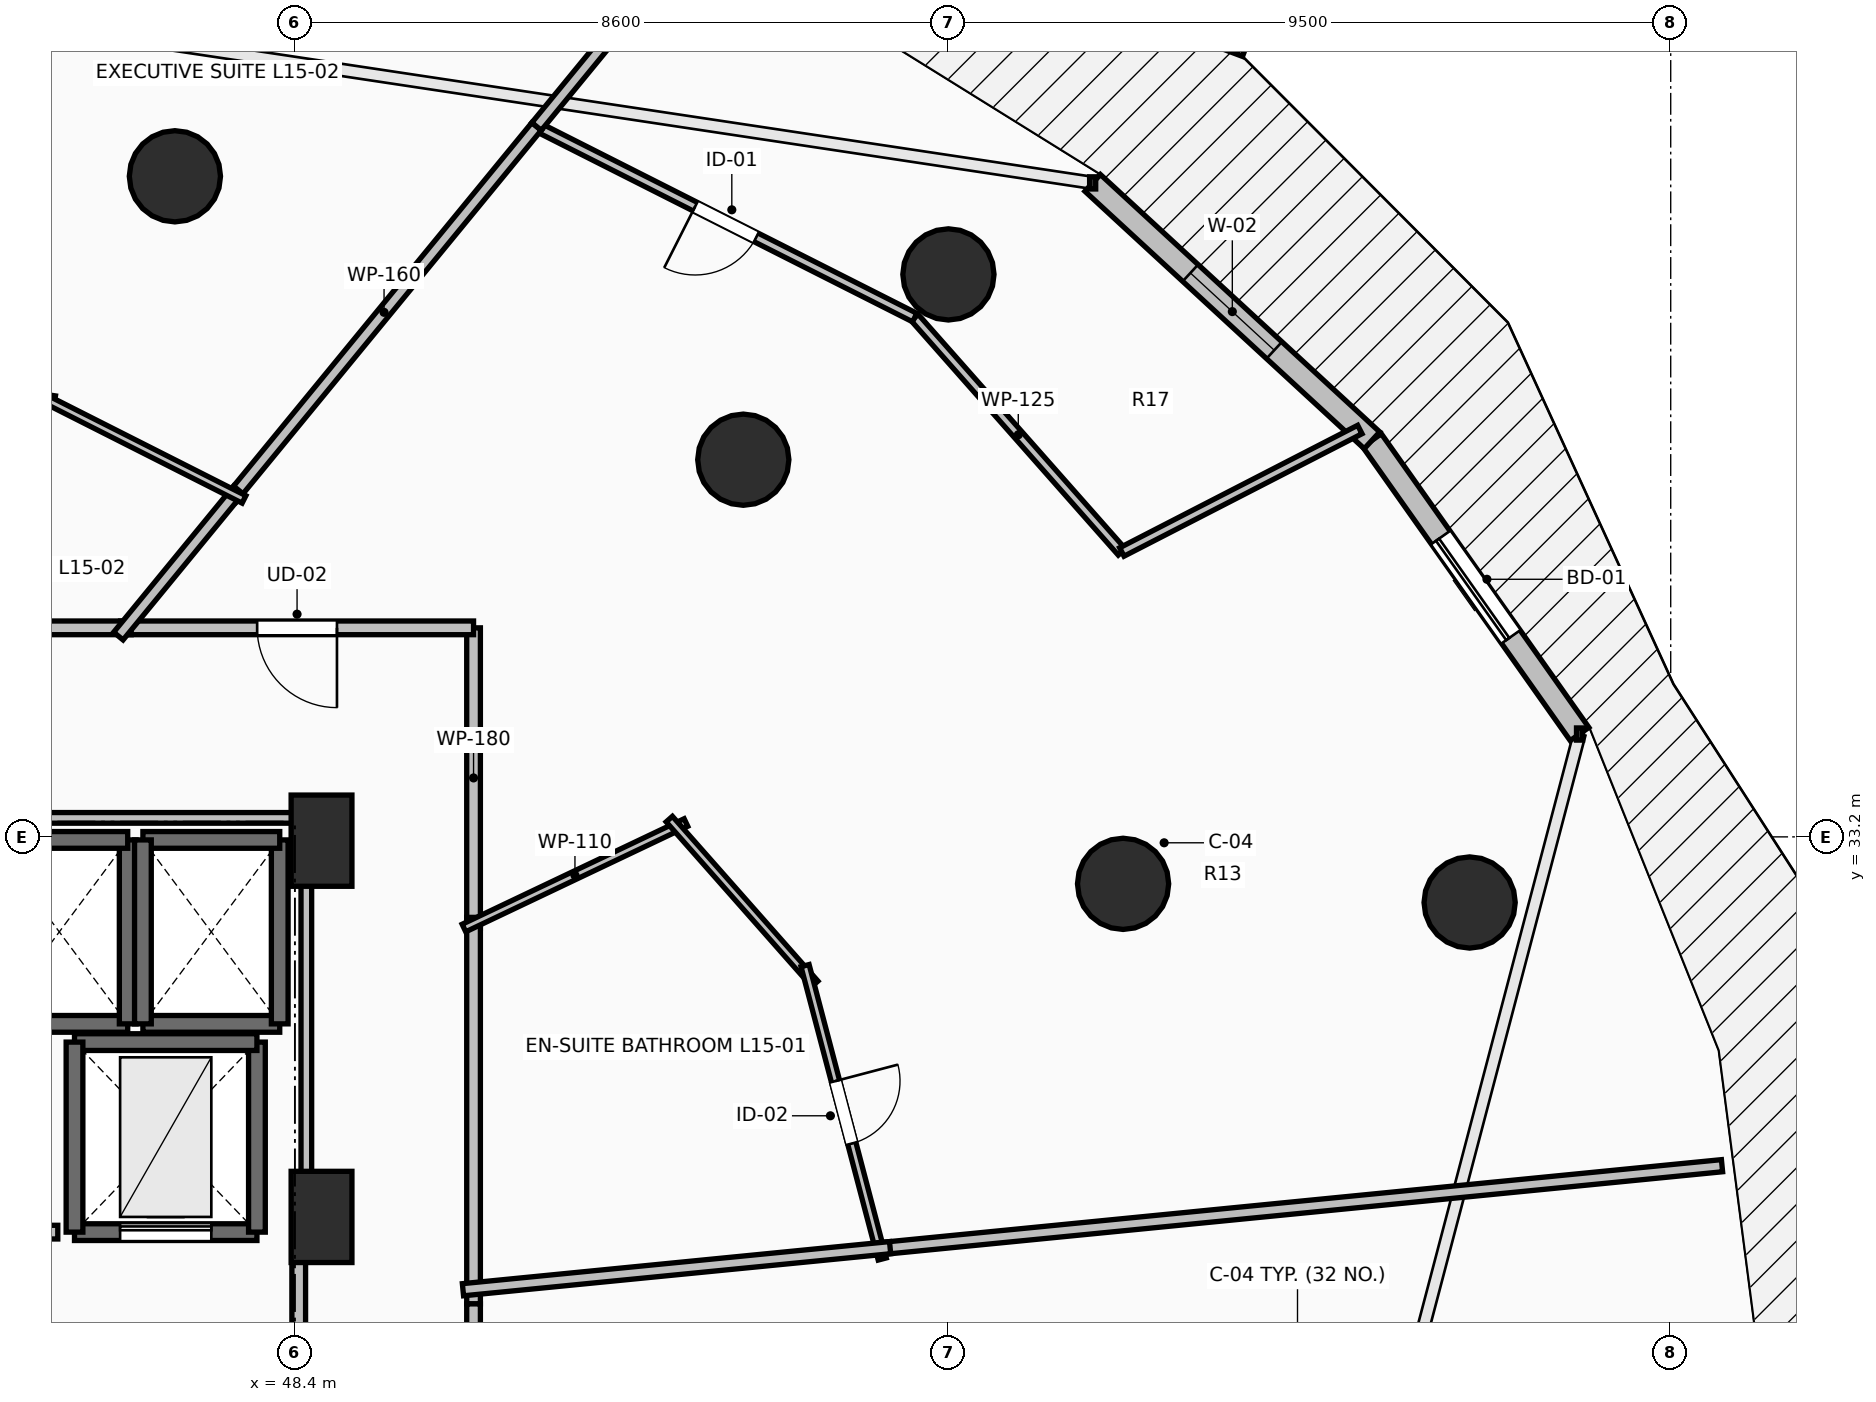
"""IFC4 building model, lengths in metres.
Left out: names, types, materials, properties, quantities, classifications, styles, units other than length and angle.
Written with IfcOpenShell. Run it as: python <this file> out.ifc"""

import sys

from ifc_helpers import new_model, si_unit, direction, frame, frame_2d, origin, origin_2d, place, context, subcontext, project, spatial, rectangle, circle, extrude, element, fill, save


model = new_model("IFC4")
c1 = context("Model", 3, precision=1e-05, world=origin(), true_north=direction((0.0, 1.0)))
c2 = subcontext(c1, "Body", "Model", "MODEL_VIEW")
j1 = project(units=[si_unit("LENGTHUNIT", "METRE"), si_unit("PLANEANGLEUNIT", "RADIAN")], contexts=[c1])
p1 = place(None, origin())
s1 = spatial("IfcSite", under=j1, at=p1, CompositionType="ELEMENT")
p2 = place(p1, origin())
s2 = spatial("IfcBuilding", under=s1, at=p2, CompositionType="ELEMENT")
p3 = place(p2, frame((0.0, 0.0, 59.0)))
s3 = spatial("IfcBuildingStorey", under=s2, at=p3, CompositionType="ELEMENT", Elevation=59.0)
for number, where, z_axis, x_axis in (
    (1, (59.295, 32.582, 0.0), (0.0, 0.0, 1.0), (0.924, 0.383, 0.0)),
    (2, (54.299, 38.162, 0.0), (0.0, 0.0, 1.0), (0.707, 0.707, 0.0)),
    (3, (46.821, 41.891, 0.0), (0.0, 0.0, 1.0), (0.383, 0.924, 0.0)),
    (4, (63.854, 32.337, 0.0), (0.0, 0.0, 1.0), (0.924, 0.383, 0.0)),
    (5, (56.997, 40.6, 0.0), (0.0, 0.0, 1.0), (0.707, 0.707, 0.0)),
):
    element("IfcColumn", number, at=place(p3, frame(where, z_axis=z_axis, x_axis=x_axis)), inside=s3, PredefinedType="COLUMN", context=c2, shape_type="SweptSolid", body=[
        extrude(circle(Radius=0.6, at=origin_2d()), origin(), (0.0, 0.0, 1.0), 3.5),
    ])
for number, where, z_axis, x_axis in (
    (6, (48.75, 33.15, 0.0), (0.0, 0.0, 1.0), (1.0, 0.0, 0.0)),
    (7, (48.75, 28.2, 0.0), (0.0, 0.0, 1.0), (1.0, 0.0, 0.0)),
):
    element("IfcColumn", number, at=place(p3, frame(where, z_axis=z_axis, x_axis=x_axis)), inside=s3, PredefinedType="PILASTER", context=c2, shape_type="SweptSolid", body=[
        extrude(rectangle(XDim=0.8, YDim=1.2, at=origin_2d()), origin(), (0.0, 0.0, 1.0), 3.5),
    ])
p4 = place(p3, frame((65.301, 34.553, 0.0), z_axis=(0.0, 0.0, 1.0), x_axis=(-0.577130815624, 0.816651713803, 0.0)))
e8 = element("IfcWall", 8, at=p4, inside=s3, PredefinedType="STANDARD", context=c2, shape_type="SweptSolid", body=[
    extrude(rectangle(XDim=4.731, YDim=0.3, at=frame_2d((2.366, 0.0))), origin(), (0.0, 0.0, 1.0), 3.24),
])
p5 = place(p4, frame((1.566, 0.0, 0.0)))
e9 = element("IfcOpeningElement", 9, at=p5, cuts=e8, PredefinedType="OPENING", context=c2, shape_type="SweptSolid", body=[
    extrude(rectangle(XDim=1.6, YDim=2.3, at=frame_2d((0.8, 1.15))), frame((0.0, 0.165, 0.0), z_axis=(0.0, -1.0, 0.0), x_axis=(1.0, 0.0, 0.0)), (0.0, 0.0, 1.0), 0.33),
])
p6 = place(p3, frame((62.57, 38.417, 0.0), z_axis=(0.0, 0.0, 1.0), x_axis=(-0.735342629635, 0.677695519419, 0.0)))
e10 = element("IfcWall", 10, at=p6, inside=s3, PredefinedType="STANDARD", context=c2, shape_type="SweptSolid", body=[
    extrude(rectangle(XDim=4.997, YDim=0.3, at=frame_2d((2.499, 0.0))), origin(), (0.0, 0.0, 1.0), 3.24),
])
p7 = place(p6, frame((1.749, 0.0, 0.85)))
e11 = element("IfcOpeningElement", 11, at=p7, cuts=e10, PredefinedType="OPENING", context=c2, shape_type="SweptSolid", body=[
    extrude(rectangle(XDim=1.5, YDim=2.19, at=frame_2d((0.75, 1.095))), frame((0.0, 0.165, 0.0), z_axis=(0.0, -1.0, 0.0), x_axis=(1.0, 0.0, 0.0)), (0.0, 0.0, 1.0), 0.33),
])
p8 = place(p3, frame((44.4, 30.74, 0.0), z_axis=(0.0, 0.0, 1.0), x_axis=(1.0, 0.0, 0.0)))
e12 = element("IfcWall", 12, at=p8, inside=s3, PredefinedType="SOLIDWALL", context=c2, shape_type="SweptSolid", body=[
    extrude(rectangle(XDim=1.8, YDim=0.22, at=frame_2d((0.9, 0.0))), origin(), (0.0, 0.0, 1.0), 3.24),
])
p9 = place(p3, frame((46.2, 30.74, 0.0), z_axis=(0.0, 0.0, 1.0), x_axis=(0.0, 1.0, 0.0)))
e13 = element("IfcWall", 13, at=p9, inside=s3, PredefinedType="SOLIDWALL", context=c2, shape_type="SweptSolid", body=[
    extrude(rectangle(XDim=2.42, YDim=0.22, at=frame_2d((1.21, 0.0))), origin(), (0.0, 0.0, 1.0), 3.24),
])
for number, where, z_axis, x_axis in (
    (14, (46.2, 33.16, 0.0), (0.0, 0.0, 1.0), (-1.0, 0.0, 0.0)),
    (15, (46.4, 30.74, 0.0), (0.0, 0.0, 1.0), (1.0, 0.0, 0.0)),
):
    element("IfcWall", number, at=place(p3, frame(where, z_axis=z_axis, x_axis=x_axis)), inside=s3, PredefinedType="SOLIDWALL", context=c2, shape_type="SweptSolid", body=[
        extrude(rectangle(XDim=1.8, YDim=0.22, at=frame_2d((0.9, 0.0))), origin(), (0.0, 0.0, 1.0), 3.24),
    ])
p10 = place(p3, frame((48.2, 30.74, 0.0), z_axis=(0.0, 0.0, 1.0), x_axis=(0.0, 1.0, 0.0)))
e16 = element("IfcWall", 16, at=p10, inside=s3, PredefinedType="SOLIDWALL", context=c2, shape_type="SweptSolid", body=[
    extrude(rectangle(XDim=2.42, YDim=0.22, at=frame_2d((1.21, 0.0))), origin(), (0.0, 0.0, 1.0), 3.24),
])
p11 = place(p3, frame((48.2, 33.16, 0.0), z_axis=(0.0, 0.0, 1.0), x_axis=(-1.0, 0.0, 0.0)))
e17 = element("IfcWall", 17, at=p11, inside=s3, PredefinedType="SOLIDWALL", context=c2, shape_type="SweptSolid", body=[
    extrude(rectangle(XDim=1.8, YDim=0.22, at=frame_2d((0.9, 0.0))), origin(), (0.0, 0.0, 1.0), 3.24),
])
p12 = place(p3, frame((46.4, 33.16, 0.0), z_axis=(0.0, 0.0, 1.0), x_axis=(0.0, -1.0, 0.0)))
e18 = element("IfcWall", 18, at=p12, inside=s3, PredefinedType="SOLIDWALL", context=c2, shape_type="SweptSolid", body=[
    extrude(rectangle(XDim=2.42, YDim=0.22, at=frame_2d((1.21, 0.0))), origin(), (0.0, 0.0, 1.0), 3.24),
])
p13 = place(p3, frame((45.5, 28.0, 0.0), z_axis=(0.0, 0.0, 1.0), x_axis=(1.0, 0.0, 0.0)))
e19 = element("IfcWall", 19, at=p13, inside=s3, PredefinedType="SHEAR", context=c2, shape_type="SweptSolid", body=[
    extrude(rectangle(XDim=2.4, YDim=0.22, at=frame_2d((1.2, 0.0))), origin(), (0.0, 0.0, 1.0), 3.24),
])
p14 = place(p13, frame((0.6, 0.0, 0.0)))
e20 = element("IfcOpeningElement", 20, at=p14, cuts=e19, PredefinedType="OPENING", context=c2, shape_type="SweptSolid", body=[
    extrude(rectangle(XDim=1.2, YDim=2.2, at=frame_2d((0.6, 1.1))), frame((0.0, 0.125, 0.0), z_axis=(0.0, -1.0, 0.0), x_axis=(1.0, 0.0, 0.0)), (0.0, 0.0, 1.0), 0.25),
])
p15 = place(p3, frame((47.9, 28.0, 0.0), z_axis=(0.0, 0.0, 1.0), x_axis=(0.0, 1.0, 0.0)))
e21 = element("IfcWall", 21, at=p15, inside=s3, PredefinedType="SHEAR", context=c2, shape_type="SweptSolid", body=[
    extrude(rectangle(XDim=2.5, YDim=0.22, at=frame_2d((1.25, 0.0))), origin(), (0.0, 0.0, 1.0), 3.24),
])
p16 = place(p3, frame((47.9, 30.5, 0.0), z_axis=(0.0, 0.0, 1.0), x_axis=(-1.0, 0.0, 0.0)))
e22 = element("IfcWall", 22, at=p16, inside=s3, PredefinedType="SHEAR", context=c2, shape_type="SweptSolid", body=[
    extrude(rectangle(XDim=2.4, YDim=0.22, at=frame_2d((1.2, 0.0))), origin(), (0.0, 0.0, 1.0), 3.24),
])
p17 = place(p3, frame((45.5, 30.5, 0.0), z_axis=(0.0, 0.0, 1.0), x_axis=(0.0, -1.0, 0.0)))
e23 = element("IfcWall", 23, at=p17, inside=s3, PredefinedType="SHEAR", context=c2, shape_type="SweptSolid", body=[
    extrude(rectangle(XDim=2.5, YDim=0.22, at=frame_2d((1.25, 0.0))), origin(), (0.0, 0.0, 1.0), 3.24),
])
p18 = place(p3, frame((48.45, 23.95, 0.0), z_axis=(0.0, 0.0, 1.0), x_axis=(0.0, 1.0, 0.0)))
e24 = element("IfcWall", 24, at=p18, inside=s3, PredefinedType="PARTITIONING", context=c2, shape_type="SweptSolid", body=[
    extrude(rectangle(XDim=4.05, YDim=0.18, at=frame_2d((2.025, 0.0))), origin(), (0.0, 0.0, 1.0), 3.24),
])
p19 = place(p18, frame((1.425, 0.0, 0.0)))
e25 = element("IfcOpeningElement", 25, at=p19, cuts=e24, PredefinedType="OPENING", context=c2, shape_type="SweptSolid", body=[
    extrude(rectangle(XDim=1.2, YDim=2.15, at=frame_2d((0.6, 1.075))), frame((0.0, 0.105, 0.0), z_axis=(0.0, -1.0, 0.0), x_axis=(1.0, 0.0, 0.0)), (0.0, 0.0, 1.0), 0.21),
])
p20 = place(p3, frame((50.75, 32.001, 0.0), z_axis=(0.0, 0.0, 1.0), x_axis=(0.0, 1.0, 0.0)))
e26 = element("IfcWall", 26, at=p20, inside=s3, PredefinedType="PARTITIONING", context=c2, shape_type="SweptSolid", body=[
    extrude(rectangle(XDim=3.949, YDim=0.18, at=frame_2d((1.975, 0.0))), origin(), (0.0, 0.0, 1.0), 2.432),
])
p21 = place(p3, frame((50.75, 35.95, 0.0), z_axis=(0.0, 0.0, 1.0), x_axis=(-1.0, 0.0, 0.0)))
e27 = element("IfcWall", 27, at=p21, inside=s3, PredefinedType="PARTITIONING", context=c2, shape_type="SweptSolid", body=[
    extrude(rectangle(XDim=4.644, YDim=0.18, at=frame_2d((2.322, 0.0))), origin(), (0.0, 0.0, 1.0), 2.432),
])
p22 = place(p21, frame((1.797, 0.0, 0.0)))
e28 = element("IfcOpeningElement", 28, at=p22, cuts=e27, PredefinedType="OPENING", context=c2, shape_type="SweptSolid", body=[
    extrude(rectangle(XDim=1.05, YDim=2.2, at=frame_2d((0.525, 1.1))), frame((0.0, 0.105, 0.0), z_axis=(0.0, -1.0, 0.0), x_axis=(1.0, 0.0, 0.0)), (0.0, 0.0, 1.0), 0.21),
])
p23 = place(p3, frame((50.75, 27.056, 0.0), z_axis=(0.0, 0.0, 1.0), x_axis=(0.0, 1.0, 0.0)))
e29 = element("IfcWall", 29, at=p23, inside=s3, PredefinedType="PARTITIONING", context=c2, shape_type="SweptSolid", body=[
    extrude(rectangle(XDim=5.085, YDim=0.18, at=frame_2d((2.542, 0.0))), origin(), (0.0, 0.0, 1.0), 2.432),
])
p24 = place(p3, frame((46.246, 35.95, 0.0), z_axis=(0.0, 0.0, 1.0), x_axis=(-1.0, 0.0, 0.0)))
e30 = element("IfcWall", 30, at=p24, inside=s3, PredefinedType="PARTITIONING", context=c2, shape_type="SweptSolid", body=[
    extrude(rectangle(XDim=4.784, YDim=0.18, at=frame_2d((2.392, 0.0))), origin(), (0.0, 0.0, 1.0), 3.24),
])
p25 = place(p3, frame((50.75, 15.596, 0.0), z_axis=(0.0, 0.0, 1.0), x_axis=(0.0, 1.0, 0.0)))
e31 = element("IfcWall", 31, at=p25, inside=s3, PredefinedType="PARTITIONING", context=c2, shape_type="SweptSolid", body=[
    extrude(rectangle(XDim=11.46, YDim=0.18, at=frame_2d((5.73, 0.0))), origin(), (0.0, 0.0, 1.0), 2.432),
])
p26 = place(p25, frame((5.23, 0.0, 0.0)))
e32 = element("IfcOpeningElement", 32, at=p26, cuts=e31, PredefinedType="OPENING", context=c2, shape_type="SweptSolid", body=[
    extrude(rectangle(XDim=1.0, YDim=2.15, at=frame_2d((0.5, 1.075))), frame((0.0, 0.105, 0.0), z_axis=(0.0, -1.0, 0.0), x_axis=(1.0, 0.0, 0.0)), (0.0, 0.0, 1.0), 0.21),
])
p27 = place(p3, frame((50.624, 32.001, 0.0), z_axis=(0.0, 0.0, 1.0), x_axis=(0.903186785932, 0.429247748647, 0.0)))
e33 = element("IfcWall", 33, at=p27, inside=s3, PredefinedType="PARTITIONING", context=c2, shape_type="SweptSolid", body=[
    extrude(rectangle(XDim=3.234, YDim=0.11, at=frame_2d((1.617, 0.0))), origin(), (0.0, 0.0, 1.0), 2.432),
])
p28 = place(p3, frame((53.325, 33.434, 0.0), z_axis=(0.0, 0.0, 1.0), x_axis=(0.661981720099, -0.749519981224, 0.0)))
e34 = element("IfcWall", 34, at=p28, inside=s3, PredefinedType="PARTITIONING", context=c2, shape_type="SweptSolid", body=[
    extrude(rectangle(XDim=2.892, YDim=0.11, at=frame_2d((1.446, 0.0))), origin(), (0.0, 0.0, 1.0), 2.432),
])
p29 = place(p3, frame((55.111, 31.506, 0.0), z_axis=(0.0, 0.0, 1.0), x_axis=(0.254405980461, -0.967097511684, 0.0)))
e35 = element("IfcWall", 35, at=p29, inside=s3, PredefinedType="PARTITIONING", context=c2, shape_type="SweptSolid", body=[
    extrude(rectangle(XDim=3.991, YDim=0.11, at=frame_2d((1.996, 0.0))), origin(), (0.0, 0.0, 1.0), 3.24),
])
p30 = place(p29, frame((1.571, 0.0, 0.0)))
e36 = element("IfcOpeningElement", 36, at=p30, cuts=e35, PredefinedType="OPENING", context=c2, shape_type="SweptSolid", body=[
    extrude(rectangle(XDim=0.85, YDim=2.1, at=frame_2d((0.425, 1.05))), frame((0.0, 0.07, 0.0), z_axis=(0.0, -1.0, 0.0), x_axis=(1.0, 0.0, 0.0)), (0.0, 0.0, 1.0), 0.14),
])
p31 = place(p3, frame((59.279, 36.948, 0.0), z_axis=(0.0, 0.0, 1.0), x_axis=(-0.662159063844, 0.749363312532, 0.0)))
e37 = element("IfcWall", 37, at=p31, inside=s3, PredefinedType="PARTITIONING", context=c2, shape_type="SweptSolid", body=[
    extrude(rectangle(XDim=4.115, YDim=0.125, at=frame_2d((2.058, 0.0))), origin(), (0.0, 0.0, 1.0), 2.432),
])
p32 = place(p3, frame((56.554, 40.032, 0.0), z_axis=(0.0, 0.0, 1.0), x_axis=(-0.892518178955, 0.451011419184, 0.0)))
e38 = element("IfcWall", 38, at=p32, inside=s3, PredefinedType="PARTITIONING", context=c2, shape_type="SweptSolid", body=[
    extrude(rectangle(XDim=5.574, YDim=0.125, at=frame_2d((2.787, 0.0))), origin(), (0.0, 0.0, 1.0), 2.432),
])
p33 = place(p32, frame((2.337, 0.0, 0.0)))
e39 = element("IfcOpeningElement", 39, at=p33, cuts=e38, PredefinedType="OPENING", context=c2, shape_type="SweptSolid", body=[
    extrude(rectangle(XDim=0.9, YDim=2.1, at=frame_2d((0.45, 1.05))), frame((0.0, 0.077, 0.0), z_axis=(0.0, -1.0, 0.0), x_axis=(1.0, 0.0, 0.0)), (0.0, 0.0, 1.0), 0.155),
])
p34 = place(p3, frame((62.41, 38.559, 0.0), z_axis=(0.0, 0.0, 1.0), x_axis=(-0.889180616302, -0.457556369852, 0.0)))
e40 = element("IfcWall", 40, at=p34, inside=s3, PredefinedType="PARTITIONING", context=c2, shape_type="SweptSolid", body=[
    extrude(rectangle(XDim=3.521, YDim=0.125, at=frame_2d((1.76, 0.0))), origin(), (0.0, 0.0, 1.0), 2.624),
])
p35 = place(p3, frame((51.579, 42.546, 0.0), z_axis=(0.0, 0.0, 1.0), x_axis=(-0.634407686013, -0.772998633846, 0.0)))
e41 = element("IfcWall", 41, at=p35, inside=s3, PredefinedType="PARTITIONING", context=c2, shape_type="SweptSolid", body=[
    extrude(rectangle(XDim=6.326, YDim=0.16, at=frame_2d((3.163, 0.0))), origin(), (0.0, 0.0, 1.0), 2.432),
])
p36 = place(p3, frame((47.655, 37.764, 0.0), z_axis=(0.0, 0.0, 1.0), x_axis=(-0.634343688691, -0.773051152653, 0.0)))
e42 = element("IfcWall", 42, at=p36, inside=s3, PredefinedType="PARTITIONING", context=c2, shape_type="SweptSolid", body=[
    extrude(rectangle(XDim=2.487, YDim=0.16, at=frame_2d((1.244, 0.0))), origin(), (0.0, 0.0, 1.0), 2.432),
])
p37 = place(p3, frame((56.091, 27.782, 0.0), z_axis=(0.0, 0.0, 1.0), x_axis=(0.995181539585, 0.098049493977, 0.0)))
e43 = element("IfcWall", 43, at=p37, inside=s3, PredefinedType="PARTITIONING", context=c2, shape_type="SweptSolid", body=[
    extrude(rectangle(XDim=11.138, YDim=0.16, at=frame_2d((5.569, 0.0))), origin(), (0.0, 0.0, 1.0), 2.624),
])
p38 = place(p3, frame((50.611, 27.242, 0.0), z_axis=(0.0, 0.0, 1.0), x_axis=(0.995185043486, 0.098013923607, 0.0)))
e44 = element("IfcWall", 44, at=p38, inside=s3, PredefinedType="PARTITIONING", context=c2, shape_type="SweptSolid", body=[
    extrude(rectangle(XDim=5.647, YDim=0.16, at=frame_2d((2.823, 0.0))), origin(), (0.0, 0.0, 1.0), 2.432),
])
p39 = place(p3, frame((53.54, 44.935, 0.0), z_axis=(0.0, 0.0, 1.0), x_axis=(-0.634432805544, -0.772978017313, 0.0)))
e45 = element("IfcWall", 45, at=p39, inside=s3, PredefinedType="PARTITIONING", context=c2, shape_type="SweptSolid", body=[
    extrude(rectangle(XDim=3.091, YDim=0.16, at=frame_2d((1.545, 0.0))), origin(), (0.0, 0.0, 1.0), 2.624),
])
p40 = place(p3, frame((42.6, 39.344, 0.0), z_axis=(0.0, 0.0, 1.0), x_axis=(0.988924954203, -0.148416424141, 0.0)))
e46 = element("IfcWall", 46, at=p40, inside=s3, PredefinedType="PARTITIONING", context=c2, shape_type="SweptSolid", body=[
    extrude(rectangle(XDim=2.671, YDim=0.11, at=frame_2d((1.336, 0.0))), origin(), (0.0, 0.0, 1.0), 3.24),
])
p41 = place(p3, frame((44.978, 39.031, 0.0), z_axis=(0.0, 0.0, 1.0), x_axis=(0.892423163915, -0.451199397725, 0.0)))
e47 = element("IfcWall", 47, at=p41, inside=s3, PredefinedType="PARTITIONING", context=c2, shape_type="SweptSolid", body=[
    extrude(rectangle(XDim=3.084, YDim=0.11, at=frame_2d((1.542, 0.0))), origin(), (0.0, 0.0, 1.0), 2.432),
])
p42 = place(p3, frame((45.28, 28.0, 0.0), z_axis=(0.0, 0.0, 1.0), x_axis=(-1.0, 0.0, 0.0)))
e48 = element("IfcWall", 48, at=p42, inside=s3, PredefinedType="PARTITIONING", context=c2, shape_type="SweptSolid", body=[
    extrude(rectangle(XDim=0.915, YDim=0.18, at=frame_2d((0.458, 0.0))), origin(), (0.0, 0.0, 1.0), 3.24),
])
p43 = place(p3, frame((44.34, 33.45, 0.0), z_axis=(0.0, 0.0, 1.0), x_axis=(1.0, 0.0, 0.0)))
e49 = element("IfcWall", 49, at=p43, inside=s3, PredefinedType="PARTITIONING", context=c2, shape_type="SweptSolid", body=[
    extrude(rectangle(XDim=4.21, YDim=0.14, at=frame_2d((2.105, 0.0))), origin(), (0.0, 0.0, 1.0), 2.432),
])
p44 = place(p3, frame((48.55, 33.45, 0.0), z_axis=(0.0, 0.0, 1.0), x_axis=(0.0, -1.0, 0.0)))
e50 = element("IfcWall", 50, at=p44, inside=s3, PredefinedType="PARTITIONING", context=c2, shape_type="SweptSolid", body=[
    extrude(rectangle(XDim=5.254, YDim=0.14, at=frame_2d((2.627, 0.0))), origin(), (0.0, 0.0, 1.0), 2.432),
])
p45 = place(p5, origin())
e51 = element("IfcDoor", 51, at=p45, inside=s3, OperationType="SLIDING_TO_LEFT", PredefinedType="DOOR", context=c2, shape_type="SweptSolid", body=[
    extrude(rectangle(XDim=1.6, YDim=2.3, at=frame_2d((0.8, 1.15))), frame((0.0, 0.025, 0.0), z_axis=(0.0, -1.0, 0.0), x_axis=(1.0, 0.0, 0.0)), (0.0, 0.0, 1.0), 0.05),
])
fill(e9, e51)
p46 = place(p7, origin())
e52 = element("IfcWindow", 52, at=p46, inside=s3, PartitioningType="SINGLE_PANEL", PredefinedType="WINDOW", context=c2, shape_type="SweptSolid", body=[
    extrude(rectangle(XDim=1.5, YDim=2.19, at=frame_2d((0.75, 1.095))), frame((0.0, 0.03, 0.0), z_axis=(0.0, -1.0, 0.0), x_axis=(1.0, 0.0, 0.0)), (0.0, 0.0, 1.0), 0.06),
])
fill(e11, e52)
p47 = place(p14, origin())
e53 = element("IfcDoor", 53, at=p47, inside=s3, OperationType="SLIDING_TO_LEFT", PredefinedType="DOOR", context=c2, shape_type="SweptSolid", body=[
    extrude(rectangle(XDim=1.2, YDim=2.2, at=frame_2d((0.6, 1.1))), frame((0.0, 0.025, 0.0), z_axis=(0.0, -1.0, 0.0), x_axis=(1.0, 0.0, 0.0)), (0.0, 0.0, 1.0), 0.05),
])
fill(e20, e53)
p48 = place(p22, origin())
e54 = element("IfcDoor", 54, at=p48, inside=s3, OperationType="SINGLE_SWING_LEFT", PredefinedType="DOOR", context=c2, shape_type="SweptSolid", body=[
    extrude(rectangle(XDim=1.05, YDim=2.2, at=frame_2d((0.525, 1.1))), frame((0.0, 0.025, 0.0), z_axis=(0.0, -1.0, 0.0), x_axis=(1.0, 0.0, 0.0)), (0.0, 0.0, 1.0), 0.05),
])
fill(e28, e54)
p49 = place(p30, origin())
e55 = element("IfcDoor", 55, at=p49, inside=s3, OperationType="SINGLE_SWING_LEFT", PredefinedType="DOOR", context=c2, shape_type="SweptSolid", body=[
    extrude(rectangle(XDim=0.85, YDim=2.1, at=frame_2d((0.425, 1.05))), frame((0.0, 0.025, 0.0), z_axis=(0.0, -1.0, 0.0), x_axis=(1.0, 0.0, 0.0)), (0.0, 0.0, 1.0), 0.05),
])
fill(e36, e55)
p50 = place(p33, origin())
e56 = element("IfcDoor", 56, at=p50, inside=s3, OperationType="SINGLE_SWING_RIGHT", PredefinedType="DOOR", context=c2, shape_type="SweptSolid", body=[
    extrude(rectangle(XDim=0.9, YDim=2.1, at=frame_2d((0.45, 1.05))), frame((0.0, 0.025, 0.0), z_axis=(0.0, -1.0, 0.0), x_axis=(1.0, 0.0, 0.0)), (0.0, 0.0, 1.0), 0.05),
])
fill(e39, e56)
save(model, sys.argv[1])
